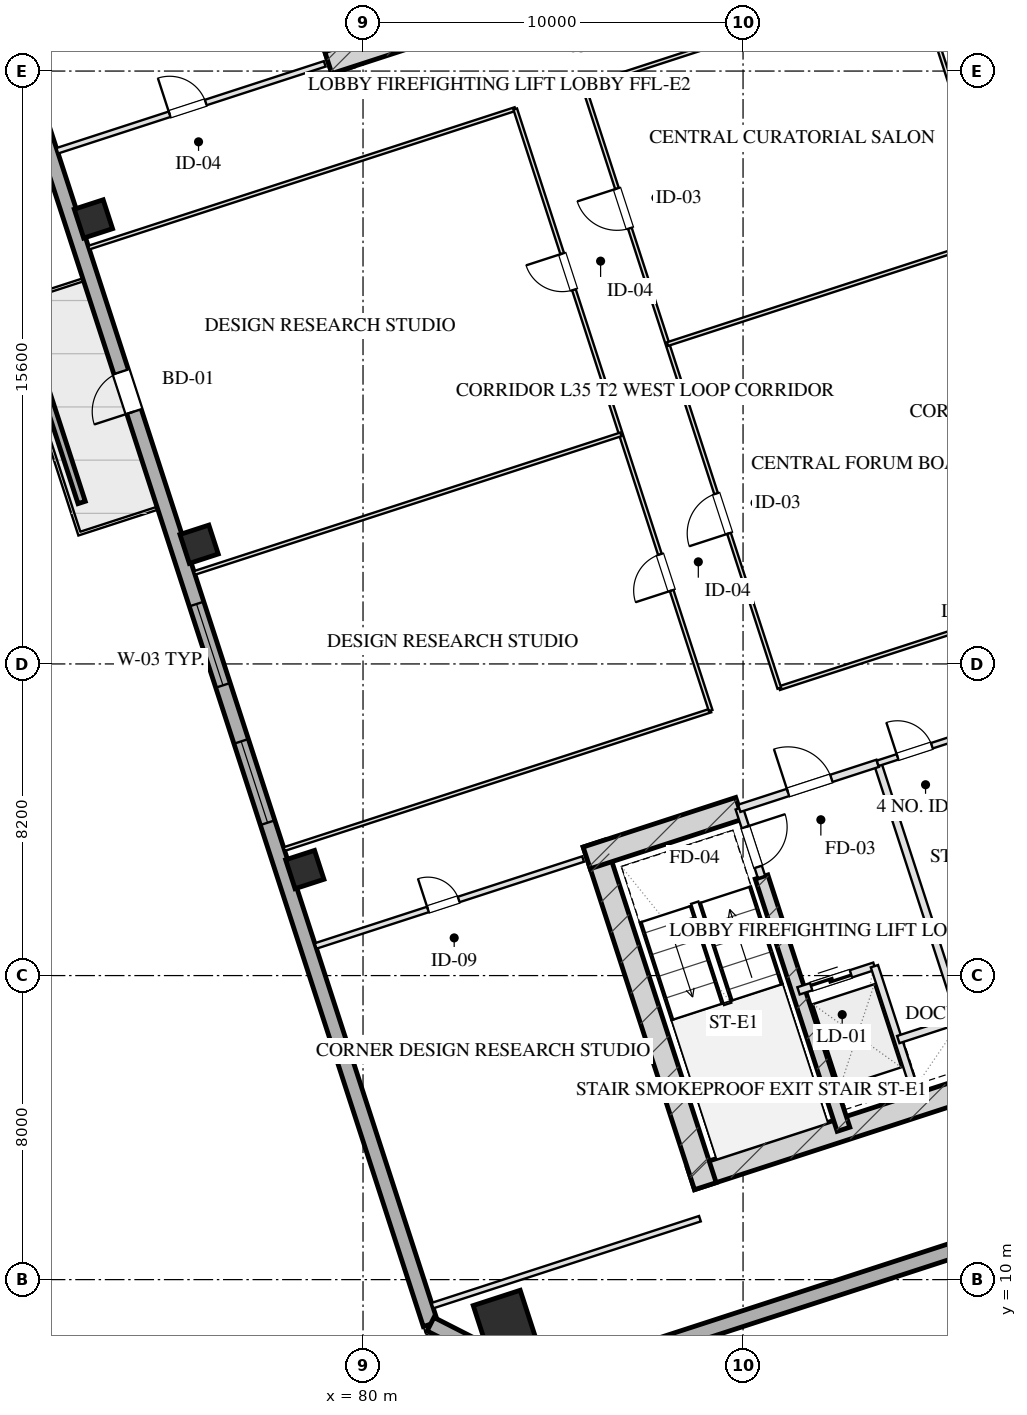
"""IFC4 building model, lengths in metres.
Left out: names, types, materials, properties, quantities, classifications, styles, units other than length and angle.
Written with IfcOpenShell. Run it as: python <this file> out.ifc"""

import sys

from ifc_helpers import new_model, si_unit, direction, frame, frame_2d, origin, origin_2d, place, context, subcontext, project, spatial, rectangle, hollow_rectangle, extrude, element, fill, save


model = new_model("IFC4")
c1 = context("Model", 3, precision=1e-05, world=origin(), true_north=direction((0.0, 1.0)))
c2 = subcontext(c1, "Body", "Model", "MODEL_VIEW")
j1 = project(units=[si_unit("LENGTHUNIT", "METRE"), si_unit("PLANEANGLEUNIT", "RADIAN")], contexts=[c1])
p1 = place(None, origin())
s1 = spatial("IfcSite", under=j1, at=p1, CompositionType="ELEMENT")
p2 = place(p1, origin())
s2 = spatial("IfcBuilding", under=s1, at=p2, CompositionType="ELEMENT")
p3 = place(p2, frame((0.0, 0.0, 134.55)))
s3 = spatial("IfcBuildingStorey", under=s2, at=p3, CompositionType="ELEMENT", Elevation=134.55)
p4 = place(p3, frame((88.63, 12.652, 0.0), z_axis=(0.0, 0.0, 1.0), x_axis=(0.95105714907, 0.309015046886, 0.0)))
e1 = element("IfcWall", 1, at=p4, inside=s3, PredefinedType="SHEAR", context=c2, shape_type="SweptSolid", body=[
    extrude(rectangle(XDim=16.4, YDim=0.6, at=frame_2d((8.2, 0.0))), origin(), (0.0, 0.0, 1.0), 3.45),
])
p5 = place(p3, frame((86.078, 21.475, 0.0), z_axis=(0.0, 0.0, 1.0), x_axis=(0.309017938678, -0.951056209472, 0.0)))
e2 = element("IfcWall", 2, at=p5, inside=s3, PredefinedType="SHEAR", context=c2, shape_type="SweptSolid", body=[
    extrude(rectangle(XDim=9.48, YDim=0.6, at=frame_2d((4.74, 0.0))), origin(), (0.0, 0.0, 1.0), 3.45),
])
p6 = place(p3, frame((90.486, 20.594, 0.0), z_axis=(0.0, 0.0, 1.0), x_axis=(0.309020428229, -0.951055400562, 0.0)))
e3 = element("IfcWall", 3, at=p6, inside=s3, PredefinedType="SHEAR", context=c2, shape_type="SweptSolid", body=[
    extrude(rectangle(XDim=6.98, YDim=0.35, at=frame_2d((3.49, 0.0))), origin(), (0.0, 0.0, 1.0), 3.45),
])
p7 = place(p3, frame((85.886, 21.097, 0.0), z_axis=(0.0, 0.0, 1.0), x_axis=(0.951068073652, 0.308981422225, 0.0)))
e4 = element("IfcWall", 4, at=p7, inside=s3, PredefinedType="SHEAR", context=c2, shape_type="SweptSolid", body=[
    extrude(rectangle(XDim=4.22, YDim=0.6, at=frame_2d((2.11, 0.0))), origin(), (0.0, 0.0, 1.0), 3.45),
])
p8 = place(p3, frame((79.466, 41.828, 0.0), z_axis=(0.0, 0.0, 1.0), x_axis=(-0.309041232772, 0.951048640421, 0.0)))
e5 = element("IfcWall", 5, at=p8, inside=s3, PredefinedType="SHEAR", context=c2, shape_type="SweptSolid", body=[
    extrude(rectangle(XDim=9.48, YDim=0.6, at=frame_2d((4.74, 0.0))), origin(), (0.0, 0.0, 1.0), 3.45),
])
p9 = place(p3, frame((79.087, 42.021, 0.0), z_axis=(0.0, 0.0, 1.0), x_axis=(0.951062550203, 0.3089984233, 0.0)))
e6 = element("IfcWall", 6, at=p9, inside=s3, PredefinedType="SHEAR", context=c2, shape_type="SweptSolid", body=[
    extrude(rectangle(XDim=4.22, YDim=0.6, at=frame_2d((2.11, 0.0))), origin(), (0.0, 0.0, 1.0), 3.45),
])
p10 = place(p3, frame((83.719, 8.901, 0.0), z_axis=(0.0, 0.0, 1.0), x_axis=(0.951056516295, 0.309016994375, 0.0)))
e7 = element("IfcColumn", 7, at=p10, inside=s3, PredefinedType="COLUMN", context=c2, shape_type="SweptSolid", body=[
    extrude(hollow_rectangle(XDim=1.3, YDim=1.3, WallThickness=0.045, at=origin_2d()), origin(), (0.0, 0.0, 1.0), 3.451),
])
for number, where, z_axis, x_axis in (
    (8, (78.468, 20.79, 0.0), (0.0, 0.0, 1.0), (0.951, 0.309, 0.0)),
    (9, (75.687, 29.349, 0.0), (0.0, 0.0, 1.0), (0.951, 0.309, 0.0)),
    (10, (72.906, 37.909, 0.0), (0.0, 0.0, 1.0), (0.951, 0.309, 0.0)),
):
    element("IfcColumn", number, at=place(p3, frame(where, z_axis=z_axis, x_axis=x_axis)), inside=s3, PredefinedType="COLUMN", context=c2, shape_type="SweptSolid", body=[
        extrude(hollow_rectangle(XDim=0.8, YDim=0.8, WallThickness=0.028, at=origin_2d()), origin(), (0.0, 0.0, 1.0), 3.451),
    ])
p11 = place(p3, frame((81.776, 8.827, 0.0), z_axis=(0.0, 0.0, 1.0), x_axis=(-0.309014228706, 0.951057414911, 0.0)))
e11 = element("IfcWall", 11, at=p11, inside=s3, PredefinedType="SOLIDWALL", context=c2, shape_type="SweptSolid", body=[
    extrude(rectangle(XDim=42.8, YDim=0.4, at=frame_2d((21.4, 0.0))), origin(), (0.0, 0.0, 1.0), 2.55),
])
p12 = place(p11, frame((13.875, 0.0, 0.75)))
e12 = element("IfcOpeningElement", 12, at=p12, cuts=e11, PredefinedType="OPENING", context=c2, shape_type="SweptSolid", body=[
    extrude(rectangle(XDim=2.25, YDim=1.4, at=frame_2d((1.125, 0.7))), frame((0.0, 0.21, 0.0), z_axis=(0.0, -1.0, 0.0), x_axis=(1.0, 0.0, 0.0)), (0.0, 0.0, 1.0), 0.42),
])
p13 = place(p11, frame((17.675, 0.0, 0.75)))
e13 = element("IfcOpeningElement", 13, at=p13, cuts=e11, PredefinedType="OPENING", context=c2, shape_type="SweptSolid", body=[
    extrude(rectangle(XDim=2.25, YDim=1.4, at=frame_2d((1.125, 0.7))), frame((0.0, 0.21, 0.0), z_axis=(0.0, -1.0, 0.0), x_axis=(1.0, 0.0, 0.0)), (0.0, 0.0, 1.0), 0.42),
])
p14 = place(p11, frame((25.25, 0.0, 0.0)))
e14 = element("IfcOpeningElement", 14, at=p14, cuts=e11, PredefinedType="OPENING", context=c2, shape_type="SweptSolid", body=[
    extrude(rectangle(XDim=1.1, YDim=2.15, at=frame_2d((0.55, 1.075))), frame((0.0, 0.21, 0.0), z_axis=(0.0, -1.0, 0.0), x_axis=(1.0, 0.0, 0.0)), (0.0, 0.0, 1.0), 0.42),
])
p15 = place(p3, frame((109.908, 15.444, 0.0), z_axis=(0.0, 0.0, 1.0), x_axis=(-0.951057580055, -0.30901372044, 0.0)))
e15 = element("IfcWall", 15, at=p15, inside=s3, PredefinedType="SOLIDWALL", context=c2, shape_type="SweptSolid", body=[
    extrude(rectangle(XDim=26.4, YDim=0.4, at=frame_2d((13.2, 0.0))), origin(), (0.0, 0.0, 1.0), 2.55),
])
p16 = place(p3, frame((84.801, 7.286, 0.0), z_axis=(0.0, 0.0, 1.0), x_axis=(-0.891020832027, 0.453962417932, 0.0)))
e16 = element("IfcWall", 16, at=p16, inside=s3, PredefinedType="SOLIDWALL", context=c2, shape_type="SweptSolid", body=[
    extrude(rectangle(XDim=3.394, YDim=0.4, at=frame_2d((1.697, 0.0))), origin(), (0.0, 0.0, 1.0), 2.55),
])
p17 = place(p3, frame((72.596, 30.448, 0.0), z_axis=(0.0, 0.0, 1.0), x_axis=(-0.30900096172, 0.951061725471, 0.0)))
e17 = element("IfcWall", 17, at=p17, inside=s3, PredefinedType="PARAPET", context=c2, shape_type="SweptSolid", body=[
    extrude(rectangle(XDim=4.8, YDim=0.2, at=frame_2d((2.4, 0.0))), origin(), (0.0, 0.0, 1.0), 0.75),
])
p18 = place(p3, frame((89.899, 22.401, 0.0), z_axis=(0.0, 0.0, 1.0), x_axis=(0.308932062672, -0.951084108086, 0.0)))
e18 = element("IfcWall", 18, at=p18, inside=s3, PredefinedType="PARTITIONING", context=c2, shape_type="SweptSolid", body=[
    extrude(rectangle(XDim=1.9, YDim=0.2, at=frame_2d((0.95, 0.0))), origin(), (0.0, 0.0, 1.0), 3.155),
])
p19 = place(p18, frame((0.52, 0.0, 0.0)))
e19 = element("IfcOpeningElement", 19, at=p19, cuts=e18, PredefinedType="OPENING", context=c2, shape_type="SweptSolid", body=[
    extrude(rectangle(XDim=1.1, YDim=2.05, at=frame_2d((0.55, 1.025))), frame((0.0, 0.11, 0.0), z_axis=(0.0, -1.0, 0.0), x_axis=(1.0, 0.0, 0.0)), (0.0, 0.0, 1.0), 0.22),
])
p20 = place(p3, frame((93.542, 23.585, 0.0), z_axis=(0.0, 0.0, 1.0), x_axis=(0.309042196757, -0.951048327176, 0.0)))
e20 = element("IfcWall", 20, at=p20, inside=s3, PredefinedType="PARTITIONING", context=c2, shape_type="SweptSolid", body=[
    extrude(rectangle(XDim=8.43, YDim=0.2, at=frame_2d((4.215, 0.0))), origin(), (0.0, 0.0, 1.0), 3.155),
])
p21 = place(p3, frame((89.899, 22.401, 0.0), z_axis=(0.0, 0.0, 1.0), x_axis=(0.951046716504, 0.309047153403, 0.0)))
e21 = element("IfcWall", 21, at=p21, inside=s3, PredefinedType="PARTITIONING", context=c2, shape_type="SweptSolid", body=[
    extrude(rectangle(XDim=3.83, YDim=0.2, at=frame_2d((1.915, 0.0))), origin(), (0.0, 0.0, 1.0), 3.155),
])
p22 = place(p21, frame((1.35, 0.0, 0.0)))
e22 = element("IfcOpeningElement", 22, at=p22, cuts=e21, PredefinedType="OPENING", context=c2, shape_type="SweptSolid", body=[
    extrude(rectangle(XDim=1.2, YDim=2.05, at=frame_2d((0.6, 1.025))), frame((0.0, 0.11, 0.0), z_axis=(0.0, -1.0, 0.0), x_axis=(1.0, 0.0, 0.0)), (0.0, 0.0, 1.0), 0.22),
])
p23 = place(p3, frame((91.46, 17.598, 0.0), z_axis=(0.0, 0.0, 1.0), x_axis=(0.951062257173, 0.308999325213, 0.0)))
e23 = element("IfcWall", 23, at=p23, inside=s3, PredefinedType="PARTITIONING", context=c2, shape_type="SweptSolid", body=[
    extrude(rectangle(XDim=2.1, YDim=0.2, at=frame_2d((1.05, 0.0))), origin(), (0.0, 0.0, 1.0), 3.155),
])
p24 = place(p23, frame((0.35, 0.0, 0.0)))
e24 = element("IfcOpeningElement", 24, at=p24, cuts=e23, PredefinedType="OPENING", context=c2, shape_type="SweptSolid", body=[
    extrude(rectangle(XDim=1.1, YDim=2.05, at=frame_2d((0.55, 1.025))), frame((0.0, 0.11, 0.0), z_axis=(0.0, -1.0, 0.0), x_axis=(1.0, 0.0, 0.0)), (0.0, 0.0, 1.0), 0.22),
])
p25 = place(p3, frame((93.457, 18.247, 0.0), z_axis=(0.0, 0.0, 1.0), x_axis=(0.3089935693, -0.951064127245, 0.0)))
e25 = element("IfcWall", 25, at=p25, inside=s3, PredefinedType="PARTITIONING", context=c2, shape_type="SweptSolid", body=[
    extrude(rectangle(XDim=3.7, YDim=0.2, at=frame_2d((1.85, 0.0))), origin(), (0.0, 0.0, 1.0), 3.155),
])
p26 = place(p3, frame((94.084, 16.317, 0.0), z_axis=(0.0, 0.0, 1.0), x_axis=(0.951041328149, 0.309063734775, 0.0)))
e26 = element("IfcWall", 26, at=p26, inside=s3, PredefinedType="PARTITIONING", context=c2, shape_type="SweptSolid", body=[
    extrude(rectangle(XDim=1.73, YDim=0.2, at=frame_2d((0.865, 0.0))), origin(), (0.0, 0.0, 1.0), 3.155),
])
p27 = place(p3, frame((93.542, 23.585, 0.0), z_axis=(0.0, 0.0, 1.0), x_axis=(0.951063829732, 0.308994485023, 0.0)))
e27 = element("IfcWall", 27, at=p27, inside=s3, PredefinedType="PARTITIONING", context=c2, shape_type="SweptSolid", body=[
    extrude(rectangle(XDim=4.4, YDim=0.15, at=frame_2d((2.2, 0.0))), origin(), (0.0, 0.0, 1.0), 3.155),
])
p28 = place(p27, frame((0.55, 0.0, 0.0)))
e28 = element("IfcOpeningElement", 28, at=p28, cuts=e27, PredefinedType="OPENING", context=c2, shape_type="SweptSolid", body=[
    extrude(rectangle(XDim=0.95, YDim=2.05, at=frame_2d((0.475, 1.025))), frame((0.0, 0.085, 0.0), z_axis=(0.0, -1.0, 0.0), x_axis=(1.0, 0.0, 0.0)), (0.0, 0.0, 1.0), 0.17),
])
p29 = place(p27, frame((2.7, 0.0, 0.0)))
e29 = element("IfcOpeningElement", 29, at=p29, cuts=e27, PredefinedType="OPENING", context=c2, shape_type="SweptSolid", body=[
    extrude(rectangle(XDim=0.95, YDim=2.05, at=frame_2d((0.475, 1.025))), frame((0.0, 0.085, 0.0), z_axis=(0.0, -1.0, 0.0), x_axis=(1.0, 0.0, 0.0)), (0.0, 0.0, 1.0), 0.17),
])
p30 = place(p3, frame((81.828, 9.316, 0.0), z_axis=(0.0, 0.0, 1.0), x_axis=(0.95105128112, 0.309033106124, 0.0)))
e30 = element("IfcWall", 30, at=p30, inside=s3, PredefinedType="PARTITIONING", context=c2, shape_type="SweptSolid", body=[
    extrude(rectangle(XDim=7.4, YDim=0.15, at=frame_2d((3.7, 0.0))), origin(), (0.0, 0.0, 1.0), 3.155),
])
p31 = place(p3, frame((78.753, 18.78, 0.0), z_axis=(0.0, 0.0, 1.0), x_axis=(0.951060977215, 0.309003264738, 0.0)))
e31 = element("IfcWall", 31, at=p31, inside=s3, PredefinedType="PARTITIONING", context=c2, shape_type="SweptSolid", body=[
    extrude(rectangle(XDim=7.4, YDim=0.15, at=frame_2d((3.7, 0.0))), origin(), (0.0, 0.0, 1.0), 3.155),
])
p32 = place(p31, frame((3.108, 0.0, 0.0)))
e32 = element("IfcOpeningElement", 32, at=p32, cuts=e31, PredefinedType="OPENING", context=c2, shape_type="SweptSolid", body=[
    extrude(rectangle(XDim=0.85, YDim=2.05, at=frame_2d((0.425, 1.025))), frame((0.0, 0.085, 0.0), z_axis=(0.0, -1.0, 0.0), x_axis=(1.0, 0.0, 0.0)), (0.0, 0.0, 1.0), 0.17),
])
p33 = place(p3, frame((71.955, 39.703, 0.0), z_axis=(0.0, 0.0, 1.0), x_axis=(0.951060977215, 0.309003264738, 0.0)))
e33 = element("IfcWall", 33, at=p33, inside=s3, PredefinedType="PARTITIONING", context=c2, shape_type="SweptSolid", body=[
    extrude(rectangle(XDim=7.4, YDim=0.15, at=frame_2d((3.7, 0.0))), origin(), (0.0, 0.0, 1.0), 3.155),
])
p34 = place(p33, frame((3.108, 0.0, 0.0)))
e34 = element("IfcOpeningElement", 34, at=p34, cuts=e33, PredefinedType="OPENING", context=c2, shape_type="SweptSolid", body=[
    extrude(rectangle(XDim=1.0, YDim=2.05, at=frame_2d((0.5, 1.025))), frame((0.0, 0.085, 0.0), z_axis=(0.0, -1.0, 0.0), x_axis=(1.0, 0.0, 0.0)), (0.0, 0.0, 1.0), 0.17),
])
p35 = place(p3, frame((77.925, 21.328, 0.0), z_axis=(0.0, 0.0, 1.0), x_axis=(0.951053984761, 0.309024785528, 0.0)))
e35 = element("IfcWall", 35, at=p35, inside=s3, PredefinedType="MOVABLE", context=c2, shape_type="SweptSolid", body=[
    extrude(rectangle(XDim=11.8, YDim=0.1, at=frame_2d((5.9, 0.0))), origin(), (0.0, 0.0, 1.0), 3.155),
])
p36 = place(p3, frame((90.954, 25.562, 0.0), z_axis=(0.0, 0.0, 1.0), x_axis=(0.951052398814, 0.309029666393, 0.0)))
e36 = element("IfcWall", 36, at=p36, inside=s3, PredefinedType="MOVABLE", context=c2, shape_type="SweptSolid", body=[
    extrude(rectangle(XDim=9.2, YDim=0.1, at=frame_2d((4.6, 0.0))), origin(), (0.0, 0.0, 1.0), 3.155),
])
p37 = place(p3, frame((72.783, 37.154, 0.0), z_axis=(0.0, 0.0, 1.0), x_axis=(0.951053984761, 0.309024785528, 0.0)))
e37 = element("IfcWall", 37, at=p37, inside=s3, PredefinedType="MOVABLE", context=c2, shape_type="SweptSolid", body=[
    extrude(rectangle(XDim=11.8, YDim=0.1, at=frame_2d((5.9, 0.0))), origin(), (0.0, 0.0, 1.0), 3.155),
])
p38 = place(p3, frame((85.812, 41.387, 0.0), z_axis=(0.0, 0.0, 1.0), x_axis=(0.951054933035, 0.309021867106, 0.0)))
e38 = element("IfcWall", 38, at=p38, inside=s3, PredefinedType="MOVABLE", context=c2, shape_type="SweptSolid", body=[
    extrude(rectangle(XDim=9.2, YDim=0.1, at=frame_2d((4.6, 0.0))), origin(), (0.0, 0.0, 1.0), 3.155),
])
p39 = place(p3, frame((89.147, 24.975, 0.0), z_axis=(0.0, 0.0, 1.0), x_axis=(-0.309022042254, 0.951054876125, 0.0)))
e39 = element("IfcWall", 39, at=p39, inside=s3, PredefinedType="MOVABLE", context=c2, shape_type="SweptSolid", body=[
    extrude(rectangle(XDim=16.64, YDim=0.1, at=frame_2d((8.32, 0.0))), origin(), (0.0, 0.0, 1.0), 3.155),
])
p40 = place(p39, frame((3.32, 0.0, 0.0)))
e40 = element("IfcOpeningElement", 40, at=p40, cuts=e39, PredefinedType="OPENING", context=c2, shape_type="SweptSolid", body=[
    extrude(rectangle(XDim=1.0, YDim=2.05, at=frame_2d((0.5, 1.025))), frame((0.0, 0.06, 0.0), z_axis=(0.0, -1.0, 0.0), x_axis=(1.0, 0.0, 0.0)), (0.0, 0.0, 1.0), 0.12),
])
p41 = place(p39, frame((11.64, 0.0, 0.0)))
e41 = element("IfcOpeningElement", 41, at=p41, cuts=e39, PredefinedType="OPENING", context=c2, shape_type="SweptSolid", body=[
    extrude(rectangle(XDim=1.0, YDim=2.05, at=frame_2d((0.5, 1.025))), frame((0.0, 0.06, 0.0), z_axis=(0.0, -1.0, 0.0), x_axis=(1.0, 0.0, 0.0)), (0.0, 0.0, 1.0), 0.12),
])
p42 = place(p3, frame((90.954, 25.562, 0.0), z_axis=(0.0, 0.0, 1.0), x_axis=(-0.30901773025, 0.951056277195, 0.0)))
e42 = element("IfcWall", 42, at=p42, inside=s3, PredefinedType="MOVABLE", context=c2, shape_type="SweptSolid", body=[
    extrude(rectangle(XDim=16.64, YDim=0.1, at=frame_2d((8.32, 0.0))), origin(), (0.0, 0.0, 1.0), 3.155),
])
p43 = place(p42, frame((4.284, 0.0, 0.0)))
e43 = element("IfcOpeningElement", 43, at=p43, cuts=e42, PredefinedType="OPENING", context=c2, shape_type="SweptSolid", body=[
    extrude(rectangle(XDim=1.1, YDim=2.05, at=frame_2d((0.55, 1.025))), frame((0.0, 0.06, 0.0), z_axis=(0.0, -1.0, 0.0), x_axis=(1.0, 0.0, 0.0)), (0.0, 0.0, 1.0), 0.12),
])
p44 = place(p42, frame((12.724, 0.0, 0.0)))
e44 = element("IfcOpeningElement", 44, at=p44, cuts=e42, PredefinedType="OPENING", context=c2, shape_type="SweptSolid", body=[
    extrude(rectangle(XDim=1.1, YDim=2.05, at=frame_2d((0.55, 1.025))), frame((0.0, 0.06, 0.0), z_axis=(0.0, -1.0, 0.0), x_axis=(1.0, 0.0, 0.0)), (0.0, 0.0, 1.0), 0.12),
])
p45 = place(p3, frame((99.704, 28.405, 0.0), z_axis=(0.0, 0.0, 1.0), x_axis=(-0.309004459387, 0.951060589068, 0.0)))
e45 = element("IfcWall", 45, at=p45, inside=s3, PredefinedType="MOVABLE", context=c2, shape_type="SweptSolid", body=[
    extrude(rectangle(XDim=16.64, YDim=0.1, at=frame_2d((8.32, 0.0))), origin(), (0.0, 0.0, 1.0), 3.155),
])
p46 = place(p3, frame((88.012, 34.616, 0.0), z_axis=(0.0, 0.0, 1.0), x_axis=(0.951054933035, 0.309021867106, 0.0)))
e46 = element("IfcWall", 46, at=p46, inside=s3, PredefinedType="MOVABLE", context=c2, shape_type="SweptSolid", body=[
    extrude(rectangle(XDim=9.2, YDim=0.1, at=frame_2d((4.6, 0.0))), origin(), (0.0, 0.0, 1.0), 3.155),
])
p47 = place(p3, frame((75.564, 28.594, 0.0), z_axis=(0.0, 0.0, 1.0), x_axis=(0.95106006537, 0.309006071232, 0.0)))
e47 = element("IfcWall", 47, at=p47, inside=s3, PredefinedType="MOVABLE", context=c2, shape_type="SweptSolid", body=[
    extrude(rectangle(XDim=11.8, YDim=0.1, at=frame_2d((5.9, 0.0))), origin(), (0.0, 0.0, 1.0), 3.155),
])
p48 = place(p12, origin())
e48 = element("IfcWindow", 48, at=p48, inside=s3, PartitioningType="TRIPLE_PANEL_VERTICAL", PredefinedType="WINDOW", context=c2, shape_type="SweptSolid", body=[
    extrude(rectangle(XDim=2.25, YDim=1.4, at=frame_2d((1.125, 0.7))), frame((0.0, 0.03, 0.0), z_axis=(0.0, -1.0, 0.0), x_axis=(1.0, 0.0, 0.0)), (0.0, 0.0, 1.0), 0.06),
])
fill(e12, e48)
p49 = place(p13, origin())
e49 = element("IfcWindow", 49, at=p49, inside=s3, PartitioningType="TRIPLE_PANEL_VERTICAL", PredefinedType="WINDOW", context=c2, shape_type="SweptSolid", body=[
    extrude(rectangle(XDim=2.25, YDim=1.4, at=frame_2d((1.125, 0.7))), frame((0.0, 0.03, 0.0), z_axis=(0.0, -1.0, 0.0), x_axis=(1.0, 0.0, 0.0)), (0.0, 0.0, 1.0), 0.06),
])
fill(e13, e49)
p50 = place(p14, origin())
e50 = element("IfcDoor", 50, at=p50, inside=s3, OperationType="SINGLE_SWING_LEFT", PredefinedType="DOOR", context=c2, shape_type="SweptSolid", body=[
    extrude(rectangle(XDim=1.1, YDim=2.15, at=frame_2d((0.55, 1.075))), frame((0.0, 0.025, 0.0), z_axis=(0.0, -1.0, 0.0), x_axis=(1.0, 0.0, 0.0)), (0.0, 0.0, 1.0), 0.05),
])
fill(e14, e50)
p51 = place(p19, origin())
e51 = element("IfcDoor", 51, at=p51, inside=s3, OperationType="SINGLE_SWING_LEFT", PredefinedType="DOOR", context=c2, shape_type="SweptSolid", body=[
    extrude(rectangle(XDim=1.1, YDim=2.05, at=frame_2d((0.55, 1.025))), frame((0.0, 0.025, 0.0), z_axis=(0.0, -1.0, 0.0), x_axis=(1.0, 0.0, 0.0)), (0.0, 0.0, 1.0), 0.05),
])
fill(e19, e51)
p52 = place(p22, origin())
e52 = element("IfcDoor", 52, at=p52, inside=s3, OperationType="SINGLE_SWING_LEFT", PredefinedType="DOOR", context=c2, shape_type="SweptSolid", body=[
    extrude(rectangle(XDim=1.2, YDim=2.05, at=frame_2d((0.6, 1.025))), frame((0.0, 0.025, 0.0), z_axis=(0.0, -1.0, 0.0), x_axis=(1.0, 0.0, 0.0)), (0.0, 0.0, 1.0), 0.05),
])
fill(e22, e52)
p53 = place(p24, origin())
e53 = element("IfcDoor", 53, at=p53, inside=s3, OperationType="DOUBLE_DOOR_SLIDING", PredefinedType="DOOR", context=c2, shape_type="SweptSolid", body=[
    extrude(rectangle(XDim=1.1, YDim=2.05, at=frame_2d((0.55, 1.025))), frame((0.0, 0.025, 0.0), z_axis=(0.0, -1.0, 0.0), x_axis=(1.0, 0.0, 0.0)), (0.0, 0.0, 1.0), 0.05),
])
fill(e24, e53)
p54 = place(p28, origin())
e54 = element("IfcDoor", 54, at=p54, inside=s3, OperationType="SINGLE_SWING_LEFT", PredefinedType="DOOR", context=c2, shape_type="SweptSolid", body=[
    extrude(rectangle(XDim=0.95, YDim=2.05, at=frame_2d((0.475, 1.025))), frame((0.0, 0.025, 0.0), z_axis=(0.0, -1.0, 0.0), x_axis=(1.0, 0.0, 0.0)), (0.0, 0.0, 1.0), 0.05),
])
fill(e28, e54)
p55 = place(p32, origin())
e55 = element("IfcDoor", 55, at=p55, inside=s3, OperationType="SINGLE_SWING_LEFT", PredefinedType="DOOR", context=c2, shape_type="SweptSolid", body=[
    extrude(rectangle(XDim=0.85, YDim=2.05, at=frame_2d((0.425, 1.025))), frame((0.0, 0.025, 0.0), z_axis=(0.0, -1.0, 0.0), x_axis=(1.0, 0.0, 0.0)), (0.0, 0.0, 1.0), 0.05),
])
fill(e32, e55)
p56 = place(p34, origin())
e56 = element("IfcDoor", 56, at=p56, inside=s3, OperationType="SINGLE_SWING_LEFT", PredefinedType="DOOR", context=c2, shape_type="SweptSolid", body=[
    extrude(rectangle(XDim=1.0, YDim=2.05, at=frame_2d((0.5, 1.025))), frame((0.0, 0.025, 0.0), z_axis=(0.0, -1.0, 0.0), x_axis=(1.0, 0.0, 0.0)), (0.0, 0.0, 1.0), 0.05),
])
fill(e34, e56)
p57 = place(p40, origin())
e57 = element("IfcDoor", 57, at=p57, inside=s3, OperationType="SINGLE_SWING_LEFT", PredefinedType="DOOR", context=c2, shape_type="SweptSolid", body=[
    extrude(rectangle(XDim=1.0, YDim=2.05, at=frame_2d((0.5, 1.025))), frame((0.0, 0.025, 0.0), z_axis=(0.0, -1.0, 0.0), x_axis=(1.0, 0.0, 0.0)), (0.0, 0.0, 1.0), 0.05),
])
fill(e40, e57)
p58 = place(p41, origin())
e58 = element("IfcDoor", 58, at=p58, inside=s3, OperationType="SINGLE_SWING_RIGHT", PredefinedType="DOOR", context=c2, shape_type="SweptSolid", body=[
    extrude(rectangle(XDim=1.0, YDim=2.05, at=frame_2d((0.5, 1.025))), frame((0.0, 0.025, 0.0), z_axis=(0.0, -1.0, 0.0), x_axis=(1.0, 0.0, 0.0)), (0.0, 0.0, 1.0), 0.05),
])
fill(e41, e58)
p59 = place(p43, origin())
e59 = element("IfcDoor", 59, at=p59, inside=s3, OperationType="SINGLE_SWING_LEFT", PredefinedType="DOOR", context=c2, shape_type="SweptSolid", body=[
    extrude(rectangle(XDim=1.1, YDim=2.05, at=frame_2d((0.55, 1.025))), frame((0.0, 0.025, 0.0), z_axis=(0.0, -1.0, 0.0), x_axis=(1.0, 0.0, 0.0)), (0.0, 0.0, 1.0), 0.05),
])
fill(e43, e59)
p60 = place(p44, origin())
e60 = element("IfcDoor", 60, at=p60, inside=s3, OperationType="SINGLE_SWING_RIGHT", PredefinedType="DOOR", context=c2, shape_type="SweptSolid", body=[
    extrude(rectangle(XDim=1.1, YDim=2.05, at=frame_2d((0.55, 1.025))), frame((0.0, 0.025, 0.0), z_axis=(0.0, -1.0, 0.0), x_axis=(1.0, 0.0, 0.0)), (0.0, 0.0, 1.0), 0.05),
])
fill(e44, e60)
save(model, sys.argv[1])
